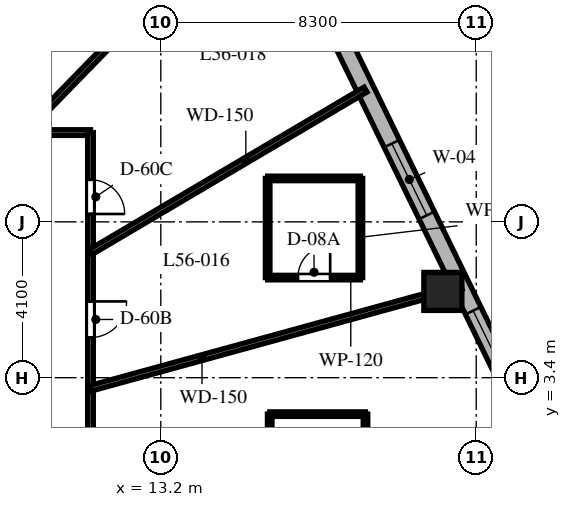
"""IFC4 building model, lengths in metres.
Left out: names, types, materials, properties, quantities, classifications, styles, units other than length and angle.
Written with IfcOpenShell. Run it as: python <this file> out.ifc"""

import sys

from ifc_helpers import new_model, si_unit, direction, frame, frame_2d, origin, origin_2d, place, context, subcontext, project, spatial, rectangle, extrude, element, fill, save


model = new_model("IFC4")
c1 = context("Model", 3, precision=1e-05, world=origin(), true_north=direction((0.0, 1.0)))
c2 = subcontext(c1, "Body", "Model", "MODEL_VIEW")
j1 = project(units=[si_unit("LENGTHUNIT", "METRE"), si_unit("PLANEANGLEUNIT", "RADIAN")], contexts=[c1])
p1 = place(None, origin())
s1 = spatial("IfcSite", under=j1, at=p1, CompositionType="ELEMENT")
p2 = place(p1, origin())
s2 = spatial("IfcBuilding", under=s1, at=p2, CompositionType="ELEMENT")
p3 = place(p2, frame((0.0, 0.0, 225.5)))
s3 = spatial("IfcBuildingStorey", under=s2, at=p3, CompositionType="ELEMENT", Elevation=225.5)
p4 = place(p3, frame((20.622, 5.67, 0.0), z_axis=(0.0, 0.0, 1.0), x_axis=(1.0, 0.0, 0.0)))
e1 = element("IfcColumn", 1, at=p4, inside=s3, PredefinedType="COLUMN", context=c2, shape_type="SweptSolid", body=[
    extrude(rectangle(XDim=1.0, YDim=1.0, at=origin_2d()), origin(), (0.0, 0.0, 1.0), 3.8),
])
p5 = place(p3, frame((22.74, 2.452, 0.0), z_axis=(0.0, 0.0, 1.0), x_axis=(-0.437753424814, 0.899095066755, 0.0)))
e2 = element("IfcWall", 2, at=p5, inside=s3, PredefinedType="SOLIDWALL", context=c2, shape_type="SweptSolid", body=[
    extrude(rectangle(XDim=19.137, YDim=0.45, at=frame_2d((9.569, 0.0))), origin(), (0.0, 0.0, 1.0), 3.5),
])
p6 = place(p5, frame((5.805, 0.0, 0.8)))
e3 = element("IfcOpeningElement", 3, at=p6, cuts=e2, PredefinedType="OPENING", context=c2, shape_type="SweptSolid", body=[
    extrude(rectangle(XDim=2.1, YDim=1.85, at=frame_2d((1.05, 0.925))), frame((0.0, 0.235, 0.0), z_axis=(0.0, -1.0, 0.0), x_axis=(1.0, 0.0, 0.0)), (0.0, 0.0, 1.0), 0.47),
])
p7 = place(p5, frame((11.199, 0.0, 0.8)))
e4 = element("IfcOpeningElement", 4, at=p7, cuts=e2, PredefinedType="OPENING", context=c2, shape_type="SweptSolid", body=[
    extrude(rectangle(XDim=2.1, YDim=1.85, at=frame_2d((1.05, 0.925))), frame((0.0, 0.235, 0.0), z_axis=(0.0, -1.0, 0.0), x_axis=(1.0, 0.0, 0.0)), (0.0, 0.0, 1.0), 0.47),
])
p8 = place(p5, frame((16.173, 0.0, 0.8)))
e5 = element("IfcOpeningElement", 5, at=p8, cuts=e2, PredefinedType="OPENING", context=c2, shape_type="SweptSolid", body=[
    extrude(rectangle(XDim=2.1, YDim=1.85, at=frame_2d((1.05, 0.925))), frame((0.0, 0.235, 0.0), z_axis=(0.0, -1.0, 0.0), x_axis=(1.0, 0.0, 0.0)), (0.0, 0.0, 1.0), 0.47),
])
p9 = place(p5, frame((0.916, 0.0, 0.8)))
e6 = element("IfcOpeningElement", 6, at=p9, cuts=e2, PredefinedType="OPENING", context=c2, shape_type="SweptSolid", body=[
    extrude(rectangle(XDim=2.1, YDim=1.85, at=frame_2d((1.05, 0.925))), frame((0.0, 0.235, 0.0), z_axis=(0.0, -1.0, 0.0), x_axis=(1.0, 0.0, 0.0)), (0.0, 0.0, 1.0), 0.47),
])
p10 = place(p3, frame((0.92, 9.85, 0.0), z_axis=(0.0, 0.0, 1.0), x_axis=(1.0, 0.0, 0.0)))
e7 = element("IfcWall", 7, at=p10, inside=s3, PredefinedType="PARTITIONING", context=c2, shape_type="SweptSolid", body=[
    extrude(rectangle(XDim=10.43, YDim=0.15, at=frame_2d((5.215, 0.0))), origin(), (0.0, 0.0, 1.0), 2.99),
])
p11 = place(p10, frame((4.949, 0.0, 0.0)))
e8 = element("IfcOpeningElement", 8, at=p11, cuts=e7, PredefinedType="OPENING", context=c2, shape_type="SweptSolid", body=[
    extrude(rectangle(XDim=0.95, YDim=2.03, at=frame_2d((0.475, 1.015))), frame((0.0, 0.085, 0.0), z_axis=(0.0, -1.0, 0.0), x_axis=(1.0, 0.0, 0.0)), (0.0, 0.0, 1.0), 0.17),
])
p12 = place(p3, frame((11.35, 9.85, 0.0), z_axis=(0.0, 0.0, 1.0), x_axis=(0.0, -1.0, 0.0)))
e9 = element("IfcWall", 9, at=p12, inside=s3, PredefinedType="PARTITIONING", context=c2, shape_type="SweptSolid", body=[
    extrude(rectangle(XDim=12.4, YDim=0.15, at=frame_2d((6.2, 0.0))), origin(), (0.0, 0.0, 1.0), 2.99),
])
p13 = place(p12, frame((4.443, 0.0, 0.0)))
e10 = element("IfcOpeningElement", 10, at=p13, cuts=e9, PredefinedType="OPENING", context=c2, shape_type="SweptSolid", body=[
    extrude(rectangle(XDim=0.95, YDim=2.03, at=frame_2d((0.475, 1.015))), frame((0.0, 0.085, 0.0), z_axis=(0.0, -1.0, 0.0), x_axis=(1.0, 0.0, 0.0)), (0.0, 0.0, 1.0), 0.17),
])
p14 = place(p12, frame((1.242, 0.0, 0.0)))
e11 = element("IfcOpeningElement", 11, at=p14, cuts=e9, PredefinedType="OPENING", context=c2, shape_type="SweptSolid", body=[
    extrude(rectangle(XDim=0.9, YDim=2.03, at=frame_2d((0.45, 1.015))), frame((0.0, 0.085, 0.0), z_axis=(0.0, -1.0, 0.0), x_axis=(1.0, 0.0, 0.0)), (0.0, 0.0, 1.0), 0.17),
])
p15 = place(p12, frame((8.835, 0.0, 0.0)))
e12 = element("IfcOpeningElement", 12, at=p15, cuts=e9, PredefinedType="OPENING", context=c2, shape_type="SweptSolid", body=[
    extrude(rectangle(XDim=0.95, YDim=2.03, at=frame_2d((0.475, 1.015))), frame((0.0, 0.085, 0.0), z_axis=(0.0, -1.0, 0.0), x_axis=(1.0, 0.0, 0.0)), (0.0, 0.0, 1.0), 0.17),
])
p16 = place(p3, frame((11.35, 3.121, 0.0), z_axis=(0.0, 0.0, 1.0), x_axis=(0.964212793822, 0.265129568758, 0.0)))
e13 = element("IfcWall", 13, at=p16, inside=s3, PredefinedType="PARTITIONING", context=c2, shape_type="SweptSolid", body=[
    extrude(rectangle(XDim=10.12, YDim=0.15, at=frame_2d((5.06, 0.0))), origin(), (0.0, 0.0, 1.0), 2.74),
])
p17 = place(p3, frame((11.35, 6.705, 0.0), z_axis=(0.0, 0.0, 1.0), x_axis=(0.86097625004, 0.508645158108, 0.0)))
e14 = element("IfcWall", 14, at=p17, inside=s3, PredefinedType="PARTITIONING", context=c2, shape_type="SweptSolid", body=[
    extrude(rectangle(XDim=8.406, YDim=0.15, at=frame_2d((4.203, 0.0))), origin(), (0.0, 0.0, 1.0), 2.74),
])
p18 = place(p3, frame((9.588, 9.85, 0.0), z_axis=(0.0, 0.0, 1.0), x_axis=(0.697519469595, 0.716565830567, 0.0)))
e15 = element("IfcWall", 15, at=p18, inside=s3, PredefinedType="PARTITIONING", context=c2, shape_type="SweptSolid", body=[
    extrude(rectangle(XDim=9.126, YDim=0.15, at=frame_2d((4.563, 0.0))), origin(), (0.0, 0.0, 1.0), 2.74),
])
p19 = place(p3, frame((16.012, 6.034, 0.0), z_axis=(0.0, 0.0, 1.0), x_axis=(1.0, 0.0, 0.0)))
e16 = element("IfcWall", 16, at=p19, inside=s3, PredefinedType="PARTITIONING", context=c2, shape_type="SweptSolid", body=[
    extrude(rectangle(XDim=2.44, YDim=0.12, at=frame_2d((1.22, 0.0))), origin(), (0.0, 0.0, 1.0), 2.94),
])
p20 = place(p19, frame((0.795, 0.0, 0.0)))
e17 = element("IfcOpeningElement", 17, at=p20, cuts=e16, PredefinedType="OPENING", context=c2, shape_type="SweptSolid", body=[
    extrude(rectangle(XDim=0.85, YDim=2.03, at=frame_2d((0.425, 1.015))), frame((0.0, 0.07, 0.0), z_axis=(0.0, -1.0, 0.0), x_axis=(1.0, 0.0, 0.0)), (0.0, 0.0, 1.0), 0.14),
])
p21 = place(p3, frame((18.452, 6.034, 0.0), z_axis=(0.0, 0.0, 1.0), x_axis=(0.0, 1.0, 0.0)))
e18 = element("IfcWall", 18, at=p21, inside=s3, PredefinedType="PARTITIONING", context=c2, shape_type="SweptSolid", body=[
    extrude(rectangle(XDim=2.61, YDim=0.12, at=frame_2d((1.305, 0.0))), origin(), (0.0, 0.0, 1.0), 2.99),
])
p22 = place(p3, frame((18.452, 8.644, 0.0), z_axis=(0.0, 0.0, 1.0), x_axis=(-1.0, 0.0, 0.0)))
e19 = element("IfcWall", 19, at=p22, inside=s3, PredefinedType="PARTITIONING", context=c2, shape_type="SweptSolid", body=[
    extrude(rectangle(XDim=2.44, YDim=0.12, at=frame_2d((1.22, 0.0))), origin(), (0.0, 0.0, 1.0), 3.5),
])
p23 = place(p3, frame((16.012, 8.644, 0.0), z_axis=(0.0, 0.0, 1.0), x_axis=(0.0, -1.0, 0.0)))
e20 = element("IfcWall", 20, at=p23, inside=s3, PredefinedType="PARTITIONING", context=c2, shape_type="SweptSolid", body=[
    extrude(rectangle(XDim=2.61, YDim=0.12, at=frame_2d((1.305, 0.0))), origin(), (0.0, 0.0, 1.0), 2.99),
])
p24 = place(p3, frame((18.586, -0.239, 0.0), z_axis=(0.0, 0.0, 1.0), x_axis=(0.0, 1.0, 0.0)))
e21 = element("IfcWall", 21, at=p24, inside=s3, PredefinedType="PARTITIONING", context=c2, shape_type="SweptSolid", body=[
    extrude(rectangle(XDim=2.68, YDim=0.12, at=frame_2d((1.34, 0.0))), origin(), (0.0, 0.0, 1.0), 3.5),
])
p25 = place(p3, frame((18.586, 2.441, 0.0), z_axis=(0.0, 0.0, 1.0), x_axis=(-1.0, 0.0, 0.0)))
e22 = element("IfcWall", 22, at=p25, inside=s3, PredefinedType="PARTITIONING", context=c2, shape_type="SweptSolid", body=[
    extrude(rectangle(XDim=2.52, YDim=0.12, at=frame_2d((1.26, 0.0))), origin(), (0.0, 0.0, 1.0), 2.94),
])
p26 = place(p3, frame((16.066, 2.441, 0.0), z_axis=(0.0, 0.0, 1.0), x_axis=(0.0, -1.0, 0.0)))
e23 = element("IfcWall", 23, at=p26, inside=s3, PredefinedType="PARTITIONING", context=c2, shape_type="SweptSolid", body=[
    extrude(rectangle(XDim=2.68, YDim=0.12, at=frame_2d((1.34, 0.0))), origin(), (0.0, 0.0, 1.0), 3.5),
])
p27 = place(p6, origin())
e24 = element("IfcWindow", 24, at=p27, inside=s3, PartitioningType="SINGLE_PANEL", PredefinedType="WINDOW", context=c2, shape_type="SweptSolid", body=[
    extrude(rectangle(XDim=2.1, YDim=1.85, at=frame_2d((1.05, 0.925))), frame((0.0, 0.03, 0.0), z_axis=(0.0, -1.0, 0.0), x_axis=(1.0, 0.0, 0.0)), (0.0, 0.0, 1.0), 0.06),
])
fill(e3, e24)
p28 = place(p9, origin())
e25 = element("IfcWindow", 25, at=p28, inside=s3, PartitioningType="SINGLE_PANEL", PredefinedType="WINDOW", context=c2, shape_type="SweptSolid", body=[
    extrude(rectangle(XDim=2.1, YDim=1.85, at=frame_2d((1.05, 0.925))), frame((0.0, 0.03, 0.0), z_axis=(0.0, -1.0, 0.0), x_axis=(1.0, 0.0, 0.0)), (0.0, 0.0, 1.0), 0.06),
])
fill(e6, e25)
p29 = place(p13, origin())
e26 = element("IfcDoor", 26, at=p29, inside=s3, OperationType="SINGLE_SWING_LEFT", PredefinedType="DOOR", context=c2, shape_type="SweptSolid", body=[
    extrude(rectangle(XDim=0.95, YDim=2.03, at=frame_2d((0.475, 1.015))), frame((0.0, 0.025, 0.0), z_axis=(0.0, -1.0, 0.0), x_axis=(1.0, 0.0, 0.0)), (0.0, 0.0, 1.0), 0.05),
])
fill(e10, e26)
p30 = place(p20, origin())
e27 = element("IfcDoor", 27, at=p30, inside=s3, OperationType="SINGLE_SWING_RIGHT", PredefinedType="DOOR", context=c2, shape_type="SweptSolid", body=[
    extrude(rectangle(XDim=0.85, YDim=2.03, at=frame_2d((0.425, 1.015))), frame((0.0, 0.025, 0.0), z_axis=(0.0, -1.0, 0.0), x_axis=(1.0, 0.0, 0.0)), (0.0, 0.0, 1.0), 0.05),
])
fill(e17, e27)
p31 = place(p14, origin())
e28 = element("IfcDoor", 28, at=p31, inside=s3, OperationType="SINGLE_SWING_RIGHT", PredefinedType="DOOR", context=c2, shape_type="SweptSolid", body=[
    extrude(rectangle(XDim=0.9, YDim=2.03, at=frame_2d((0.45, 1.015))), frame((0.0, 0.025, 0.0), z_axis=(0.0, -1.0, 0.0), x_axis=(1.0, 0.0, 0.0)), (0.0, 0.0, 1.0), 0.05),
])
fill(e11, e28)
save(model, sys.argv[1])
